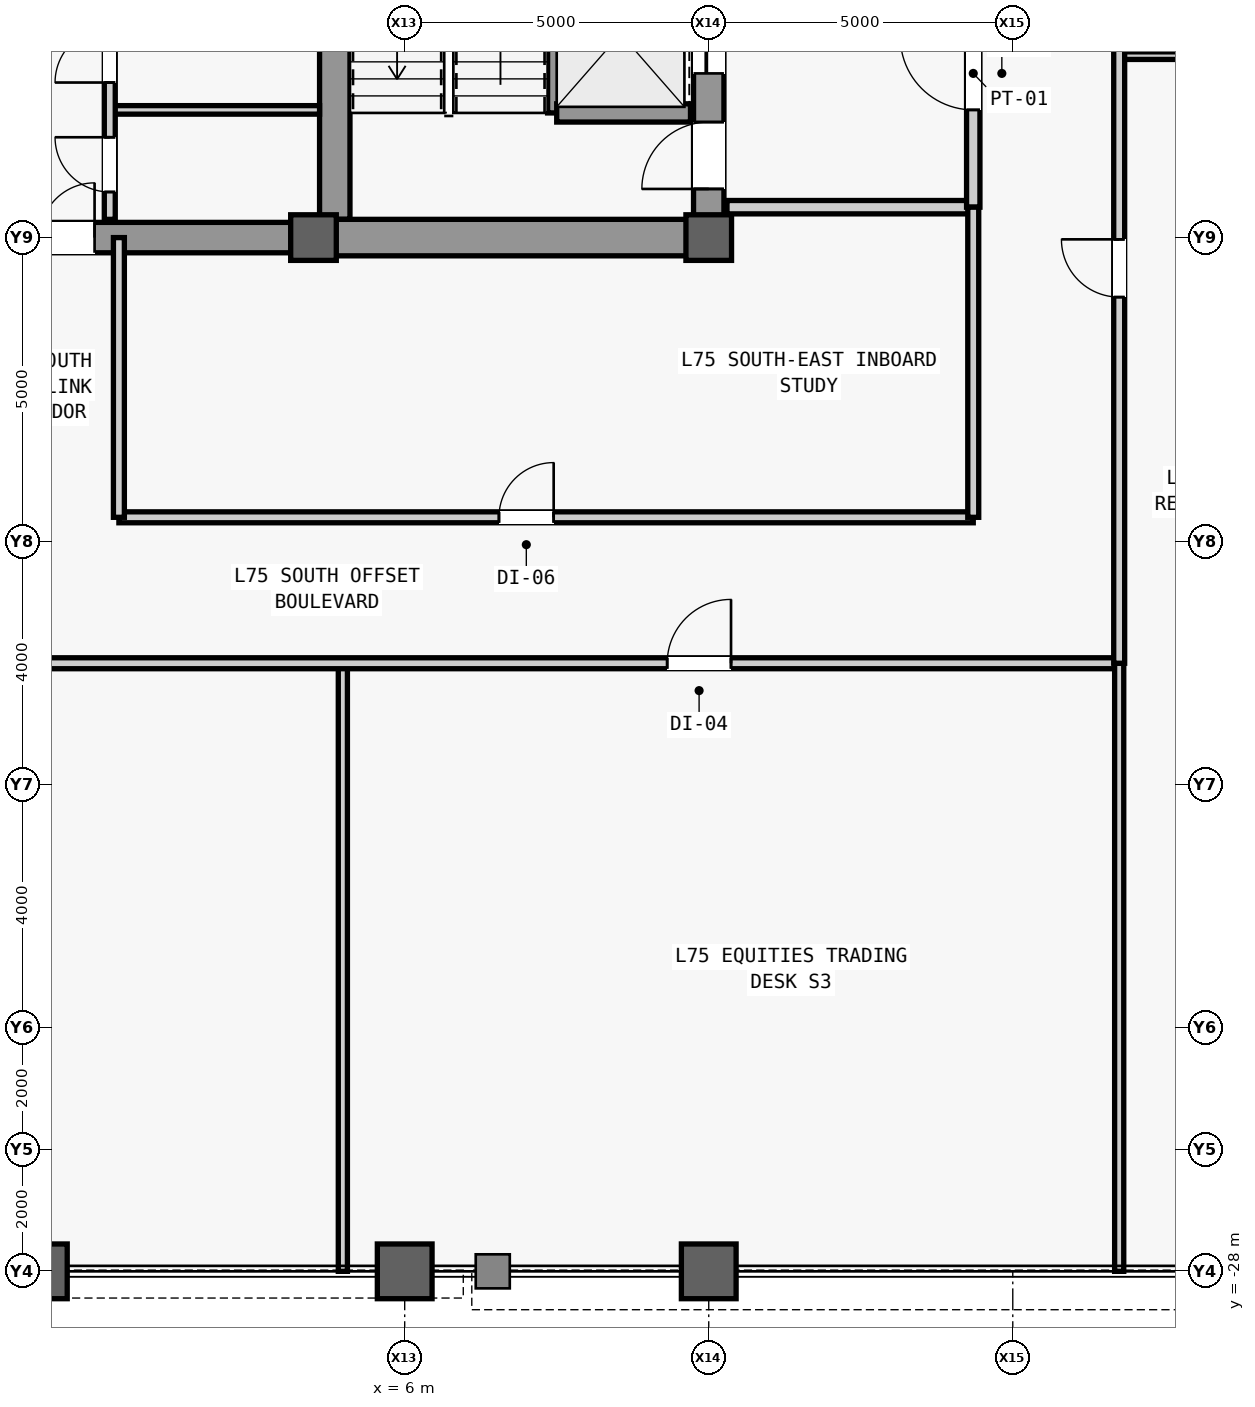
"""IFC4 building model, lengths in metres.
Left out: names, types, materials, properties, quantities, classifications, styles, units other than length and angle.
Written with IfcOpenShell. Run it as: python <this file> out.ifc"""

import sys

from ifc_helpers import new_model, si_unit, direction, frame, frame_2d, origin, origin_2d, place, context, subcontext, project, spatial, rectangle, hollow_rectangle, extrude, source, transform, mapped, element, fill, save


model = new_model("IFC4")
c1 = context("Model", 3, precision=1e-05, world=origin(), true_north=direction((0.0, 1.0)))
c2 = subcontext(c1, "Body", "Model", "MODEL_VIEW")
j1 = project(units=[si_unit("LENGTHUNIT", "METRE"), si_unit("PLANEANGLEUNIT", "RADIAN")], contexts=[c1])
p1 = place(None, origin())
s1 = spatial("IfcSite", under=j1, at=p1, CompositionType="ELEMENT")
p2 = place(p1, origin())
s2 = spatial("IfcBuilding", under=s1, at=p2, CompositionType="ELEMENT")
p3 = place(p2, frame((0.0, 0.0, 317.5)))
s3 = spatial("IfcBuildingStorey", under=s2, at=p3, CompositionType="ELEMENT", Elevation=317.5)
m1 = source(origin(), c2, "Body", "SweptSolid", [
    extrude(rectangle(XDim=22.0, YDim=0.5, at=frame_2d((11.0, 0.0))), origin(), (0.0, 0.0, 1.0), 3.78),
])
p4 = place(p3, frame((11.0, -11.0, 0.0), z_axis=(0.0, 0.0, 1.0), x_axis=(0.0, 1.0, 0.0)))
e1 = element("IfcWall", 1, at=p4, inside=s3, PredefinedType="SHEAR", context=c2, shape_type="MappedRepresentation", body=[
    mapped(m1, transform((0.0, 0.0, 0.0), scale=1.0)),
])
m2 = source(origin(), c2, "Body", "SweptSolid", [
    extrude(rectangle(XDim=1.1, YDim=2.2, at=frame_2d((0.55, 1.1))), frame((0.0, 0.26, 0.0), z_axis=(0.0, -1.0, 0.0), x_axis=(1.0, 0.0, 0.0)), (0.0, 0.0, 1.0), 0.52),
])
p5 = place(p4, frame((0.8, 0.0, 0.0)))
e2 = element("IfcOpeningElement", 2, at=p5, cuts=e1, PredefinedType="OPENING", context=c2, shape_type="MappedRepresentation", body=[
    mapped(m2, transform((0.0, 0.0, 0.0), scale=1.0)),
])
m3 = source(origin(), c2, "Body", "SweptSolid", [
    extrude(rectangle(XDim=0.9, YDim=2.15, at=frame_2d((0.45, 1.075))), frame((0.0, 0.26, 0.0), z_axis=(0.0, -1.0, 0.0), x_axis=(1.0, 0.0, 0.0)), (0.0, 0.0, 1.0), 0.52),
])
p6 = place(p4, frame((6.85, 0.0, 0.0)))
e3 = element("IfcOpeningElement", 3, at=p6, cuts=e1, PredefinedType="OPENING", context=c2, shape_type="MappedRepresentation", body=[
    mapped(m3, transform((0.0, 0.0, 0.0), scale=1.0)),
])
m4 = source(origin(), c2, "Body", "SweptSolid", [
    extrude(rectangle(XDim=1.2, YDim=2.3, at=frame_2d((0.6, 1.15))), frame((0.0, 0.26, 0.0), z_axis=(0.0, -1.0, 0.0), x_axis=(1.0, 0.0, 0.0)), (0.0, 0.0, 1.0), 0.52),
])
p7 = place(p4, frame((17.6, 0.0, 0.0)))
e4 = element("IfcOpeningElement", 4, at=p7, cuts=e1, PredefinedType="OPENING", context=c2, shape_type="MappedRepresentation", body=[
    mapped(m4, transform((0.0, 0.0, 0.0), scale=1.0)),
])
p8 = place(p4, frame((19.6, 0.0, 0.0)))
e5 = element("IfcOpeningElement", 5, at=p8, cuts=e1, PredefinedType="OPENING", context=c2, shape_type="MappedRepresentation", body=[
    mapped(m4, transform((0.0, 0.0, 0.0), scale=1.0)),
])
m5 = source(origin(), c2, "Body", "SweptSolid", [
    extrude(rectangle(XDim=1.3, YDim=2.3, at=frame_2d((0.65, 1.15))), frame((0.0, 0.26, 0.0), z_axis=(0.0, -1.0, 0.0), x_axis=(1.0, 0.0, 0.0)), (0.0, 0.0, 1.0), 0.52),
])
p9 = place(p4, frame((2.7, 0.0, 0.0)))
e6 = element("IfcOpeningElement", 6, at=p9, cuts=e1, PredefinedType="OPENING", context=c2, shape_type="MappedRepresentation", body=[
    mapped(m5, transform((0.0, 0.0, 0.0), scale=1.0)),
])
p10 = place(p4, frame((13.35, 0.0, 0.0)))
e7 = element("IfcOpeningElement", 7, at=p10, cuts=e1, PredefinedType="OPENING", context=c2, shape_type="MappedRepresentation", body=[
    mapped(m5, transform((0.0, 0.0, 0.0), scale=1.0)),
])
m6 = source(origin(), c2, "Body", "SweptSolid", [
    extrude(rectangle(XDim=21.4, YDim=0.5, at=frame_2d((10.7, 0.0))), origin(), (0.0, 0.0, 1.0), 3.78),
])
p11 = place(p3, frame((4.85, -10.7, 0.0), z_axis=(0.0, 0.0, 1.0), x_axis=(0.0, 1.0, 0.0)))
e8 = element("IfcWall", 8, at=p11, inside=s3, PredefinedType="SHEAR", context=c2, shape_type="MappedRepresentation", body=[
    mapped(m6, transform((0.0, 0.0, 0.0), scale=1.0)),
])
m7 = source(origin(), c2, "Body", "SweptSolid", [
    extrude(rectangle(XDim=5.9, YDim=0.6, at=frame_2d((2.95, 0.0))), origin(), (0.0, 0.0, 1.0), 3.78),
])
p12 = place(p3, frame((4.85, -11.0, 0.0), z_axis=(0.0, 0.0, 1.0), x_axis=(1.0, 0.0, 0.0)))
e9 = element("IfcWall", 9, at=p12, inside=s3, PredefinedType="SHEAR", context=c2, shape_type="MappedRepresentation", body=[
    mapped(m7, transform((0.0, 0.0, 0.0), scale=1.0)),
])
m8 = source(origin(), c2, "Body", "SweptSolid", [
    extrude(rectangle(XDim=9.2, YDim=0.5, at=frame_2d((4.6, 0.0))), origin(), (0.0, 0.0, 1.0), 3.78),
])
p13 = place(p3, frame((-4.6, -11.0, 0.0), z_axis=(0.0, 0.0, 1.0), x_axis=(1.0, 0.0, 0.0)))
e10 = element("IfcWall", 10, at=p13, inside=s3, PredefinedType="SHEAR", context=c2, shape_type="MappedRepresentation", body=[
    mapped(m8, transform((0.0, 0.0, 0.0), scale=1.0)),
])
m9 = source(origin(), c2, "Body", "SweptSolid", [
    extrude(rectangle(XDim=1.8, YDim=2.25, at=frame_2d((0.9, 1.125))), frame((0.0, 0.26, 0.0), z_axis=(0.0, -1.0, 0.0), x_axis=(1.0, 0.0, 0.0)), (0.0, 0.0, 1.0), 0.52),
])
p14 = place(p13, frame((3.7, 0.0, 0.0)))
e11 = element("IfcOpeningElement", 11, at=p14, cuts=e10, PredefinedType="OPENING", context=c2, shape_type="MappedRepresentation", body=[
    mapped(m9, transform((0.0, 0.0, 0.0), scale=1.0)),
])
m10 = source(origin(), c2, "Body", "SweptSolid", [
    extrude(hollow_rectangle(XDim=0.9, YDim=0.9, WallThickness=0.05, at=origin_2d()), origin(), (0.0, 0.0, 1.0), 4.0),
])
p15 = place(p3, frame((0.0, -28.0, 0.0), z_axis=(0.0, 0.0, 1.0), x_axis=(1.0, 0.0, 0.0)))
e12 = element("IfcColumn", 12, at=p15, inside=s3, PredefinedType="COLUMN", context=c2, shape_type="MappedRepresentation", body=[
    mapped(m10, transform((0.0, 0.0, 0.0), scale=1.0)),
])
m11 = source(origin(), c2, "Body", "SweptSolid", [
    extrude(rectangle(XDim=0.75, YDim=0.75, at=origin_2d()), origin(), (0.0, 0.0, 1.0), 4.0),
])
p16 = place(p3, frame((4.5, -11.0, 0.0), z_axis=(0.0, 0.0, 1.0), x_axis=(1.0, 0.0, 0.0)))
e13 = element("IfcColumn", 13, at=p16, inside=s3, PredefinedType="COLUMN", context=c2, shape_type="MappedRepresentation", body=[
    mapped(m11, transform((0.0, 0.0, 0.0), scale=1.0)),
])
for number, where, z_axis, x_axis in (
    (14, (6.0, -28.0, 0.0), (0.0, 0.0, 1.0), (1.0, 0.0, 0.0)),
    (15, (11.0, -28.0, 0.0), (0.0, 0.0, 1.0), (1.0, 0.0, 0.0)),
):
    element("IfcColumn", number, at=place(p3, frame(where, z_axis=z_axis, x_axis=x_axis)), inside=s3, PredefinedType="COLUMN", context=c2, shape_type="MappedRepresentation", body=[
        mapped(m10, transform((0.0, 0.0, 0.0), scale=1.0)),
    ])
p17 = place(p3, frame((11.0, -11.0, 0.0), z_axis=(0.0, 0.0, 1.0), x_axis=(1.0, 0.0, 0.0)))
e16 = element("IfcColumn", 16, at=p17, inside=s3, PredefinedType="COLUMN", context=c2, shape_type="MappedRepresentation", body=[
    mapped(m11, transform((0.0, 0.0, 0.0), scale=1.0)),
])
m12 = source(origin(), c2, "Body", "SweptSolid", [
    extrude(rectangle(XDim=7.8, YDim=0.3, at=frame_2d((3.9, 0.0))), origin(), (0.0, 0.0, 1.0), 3.78),
])
p18 = place(p3, frame((8.5, -8.95, 0.0), z_axis=(0.0, 0.0, 1.0), x_axis=(0.0, 1.0, 0.0)))
e17 = element("IfcWall", 17, at=p18, inside=s3, PredefinedType="SHEAR", context=c2, shape_type="MappedRepresentation", body=[
    mapped(m12, transform((0.0, 0.0, 0.0), scale=1.0)),
])
m13 = source(origin(), c2, "Body", "SweptSolid", [
    extrude(rectangle(XDim=2.2, YDim=0.3, at=frame_2d((1.1, 0.0))), origin(), (0.0, 0.0, 1.0), 3.78),
])
p19 = place(p3, frame((8.5, -8.95, 0.0), z_axis=(0.0, 0.0, 1.0), x_axis=(1.0, 0.0, 0.0)))
e18 = element("IfcWall", 18, at=p19, inside=s3, PredefinedType="SHEAR", context=c2, shape_type="MappedRepresentation", body=[
    mapped(m13, transform((0.0, 0.0, 0.0), scale=1.0)),
])
m14 = source(origin(), c2, "Body", "SweptSolid", [
    extrude(rectangle(XDim=4.05, YDim=0.22, at=frame_2d((2.025, 0.0))), origin(), (0.0, 0.0, 1.0), 3.78),
])
p20 = place(p3, frame((11.3, -10.5, 0.0), z_axis=(0.0, 0.0, 1.0), x_axis=(1.0, 0.0, 0.0)))
e19 = element("IfcWall", 19, at=p20, inside=s3, PredefinedType="PARTITIONING", context=c2, shape_type="MappedRepresentation", body=[
    mapped(m14, transform((0.0, 0.0, 0.0), scale=1.0)),
])
m15 = source(origin(), c2, "Body", "SweptSolid", [
    extrude(rectangle(XDim=4.4, YDim=0.22, at=frame_2d((2.2, 0.0))), origin(), (0.0, 0.0, 1.0), 3.78),
])
p21 = place(p3, frame((15.35, -10.5, 0.0), z_axis=(0.0, 0.0, 1.0), x_axis=(0.0, 1.0, 0.0)))
e20 = element("IfcWall", 20, at=p21, inside=s3, PredefinedType="PARTITIONING", context=c2, shape_type="MappedRepresentation", body=[
    mapped(m15, transform((0.0, 0.0, 0.0), scale=1.0)),
])
m16 = source(origin(), c2, "Body", "SweptSolid", [
    extrude(rectangle(XDim=1.2, YDim=2.2, at=frame_2d((0.6, 1.1))), frame((0.0, 0.12, 0.0), z_axis=(0.0, -1.0, 0.0), x_axis=(1.0, 0.0, 0.0)), (0.0, 0.0, 1.0), 0.24),
])
p22 = place(p21, frame((1.6, 0.0, 0.0)))
e21 = element("IfcOpeningElement", 21, at=p22, cuts=e20, PredefinedType="OPENING", context=c2, shape_type="MappedRepresentation", body=[
    mapped(m16, transform((0.0, 0.0, 0.0), scale=1.0)),
])
m17 = source(origin(), c2, "Body", "SweptSolid", [
    extrude(rectangle(XDim=3.45, YDim=0.14, at=frame_2d((1.725, 0.0))), origin(), (0.0, 0.0, 1.0), 3.78),
])
p23 = place(p3, frame((1.15, -8.9, 0.0), z_axis=(0.0, 0.0, 1.0), x_axis=(1.0, 0.0, 0.0)))
e22 = element("IfcWall", 22, at=p23, inside=s3, PredefinedType="PARTITIONING", context=c2, shape_type="MappedRepresentation", body=[
    mapped(m17, transform((0.0, 0.0, 0.0), scale=1.0)),
])
m18 = source(origin(), c2, "Body", "SweptSolid", [
    extrude(rectangle(XDim=5.4, YDim=0.18, at=frame_2d((2.7, 0.0))), origin(), (0.0, 0.0, 1.0), 3.78),
])
p24 = place(p3, frame((1.15, -10.7, 0.0), z_axis=(0.0, 0.0, 1.0), x_axis=(0.0, 1.0, 0.0)))
e23 = element("IfcWall", 23, at=p24, inside=s3, PredefinedType="PARTITIONING", context=c2, shape_type="MappedRepresentation", body=[
    mapped(m18, transform((0.0, 0.0, 0.0), scale=1.0)),
])
m19 = source(origin(), c2, "Body", "SweptSolid", [
    extrude(rectangle(XDim=0.9, YDim=2.15, at=frame_2d((0.45, 1.075))), frame((0.0, 0.1, 0.0), z_axis=(0.0, -1.0, 0.0), x_axis=(1.0, 0.0, 0.0)), (0.0, 0.0, 1.0), 0.2),
])
p25 = place(p24, frame((0.45, 0.0, 0.0)))
e24 = element("IfcOpeningElement", 24, at=p25, cuts=e23, PredefinedType="OPENING", context=c2, shape_type="MappedRepresentation", body=[
    mapped(m19, transform((0.0, 0.0, 0.0), scale=1.0)),
])
p26 = place(p24, frame((2.25, 0.0, 0.0)))
e25 = element("IfcOpeningElement", 25, at=p26, cuts=e23, PredefinedType="OPENING", context=c2, shape_type="MappedRepresentation", body=[
    mapped(m19, transform((0.0, 0.0, 0.0), scale=1.0)),
])
p27 = place(p24, frame((4.05, 0.0, 0.0)))
e26 = element("IfcOpeningElement", 26, at=p27, cuts=e23, PredefinedType="OPENING", context=c2, shape_type="MappedRepresentation", body=[
    mapped(m19, transform((0.0, 0.0, 0.0), scale=1.0)),
])
m20 = source(origin(), c2, "Body", "SweptSolid", [
    extrude(rectangle(XDim=14.05, YDim=0.18, at=frame_2d((7.025, 0.0))), origin(), (0.0, 0.0, 1.0), 3.78),
])
p28 = place(p3, frame((1.3, -15.6, 0.0), z_axis=(0.0, 0.0, 1.0), x_axis=(1.0, 0.0, 0.0)))
e27 = element("IfcWall", 27, at=p28, inside=s3, PredefinedType="PARTITIONING", context=c2, shape_type="MappedRepresentation", body=[
    mapped(m20, transform((0.0, 0.0, 0.0), scale=1.0)),
])
p29 = place(p28, frame((6.25, 0.0, 0.0)))
e28 = element("IfcOpeningElement", 28, at=p29, cuts=e27, PredefinedType="OPENING", context=c2, shape_type="MappedRepresentation", body=[
    mapped(m19, transform((0.0, 0.0, 0.0), scale=1.0)),
])
m21 = source(origin(), c2, "Body", "SweptSolid", [
    extrude(rectangle(XDim=4.6, YDim=0.18, at=frame_2d((2.3, 0.0))), origin(), (0.0, 0.0, 1.0), 3.78),
])
p30 = place(p3, frame((1.3, -15.6, 0.0), z_axis=(0.0, 0.0, 1.0), x_axis=(0.0, 1.0, 0.0)))
e29 = element("IfcWall", 29, at=p30, inside=s3, PredefinedType="PARTITIONING", context=c2, shape_type="MappedRepresentation", body=[
    mapped(m21, transform((0.0, 0.0, 0.0), scale=1.0)),
])
m22 = source(origin(), c2, "Body", "SweptSolid", [
    extrude(rectangle(XDim=5.1, YDim=0.18, at=frame_2d((2.55, 0.0))), origin(), (0.0, 0.0, 1.0), 3.78),
])
p31 = place(p3, frame((15.35, -15.6, 0.0), z_axis=(0.0, 0.0, 1.0), x_axis=(0.0, 1.0, 0.0)))
e30 = element("IfcWall", 30, at=p31, inside=s3, PredefinedType="PARTITIONING", context=c2, shape_type="MappedRepresentation", body=[
    mapped(m22, transform((0.0, 0.0, 0.0), scale=1.0)),
])
m23 = source(origin(), c2, "Body", "SweptSolid", [
    extrude(rectangle(XDim=10.0, YDim=0.15, at=frame_2d((5.0, 0.0))), origin(), (0.0, 0.0, 1.0), 3.78),
])
p32 = place(p3, frame((4.983, -28.0, 0.0), z_axis=(0.0, 0.0, 1.0), x_axis=(0.0, 1.0, 0.0)))
e31 = element("IfcWall", 31, at=p32, inside=s3, PredefinedType="PARTITIONING", context=c2, shape_type="MappedRepresentation", body=[
    mapped(m23, transform((0.0, 0.0, 0.0), scale=1.0)),
])
m24 = source(origin(), c2, "Body", "SweptSolid", [
    extrude(rectangle(XDim=37.55, YDim=0.18, at=frame_2d((18.775, 0.0))), origin(), (0.0, 0.0, 1.0), 3.78),
])
p33 = place(p3, frame((-19.8, -18.0, 0.0), z_axis=(0.0, 0.0, 1.0), x_axis=(1.0, 0.0, 0.0)))
e32 = element("IfcWall", 32, at=p33, inside=s3, PredefinedType="PARTITIONING", context=c2, shape_type="MappedRepresentation", body=[
    mapped(m24, transform((0.0, 0.0, 0.0), scale=1.0)),
])
m25 = source(origin(), c2, "Body", "SweptSolid", [
    extrude(rectangle(XDim=1.05, YDim=2.2, at=frame_2d((0.525, 1.1))), frame((0.0, 0.1, 0.0), z_axis=(0.0, -1.0, 0.0), x_axis=(1.0, 0.0, 0.0)), (0.0, 0.0, 1.0), 0.2),
])
p34 = place(p33, frame((5.983, 0.0, 0.0)))
e33 = element("IfcOpeningElement", 33, at=p34, cuts=e32, PredefinedType="OPENING", context=c2, shape_type="MappedRepresentation", body=[
    mapped(m25, transform((0.0, 0.0, 0.0), scale=1.0)),
])
p35 = place(p33, frame((17.875, 0.0, 0.0)))
e34 = element("IfcOpeningElement", 34, at=p35, cuts=e32, PredefinedType="OPENING", context=c2, shape_type="MappedRepresentation", body=[
    mapped(m25, transform((0.0, 0.0, 0.0), scale=1.0)),
])
p36 = place(p33, frame((30.116, 0.0, 0.0)))
e35 = element("IfcOpeningElement", 35, at=p36, cuts=e32, PredefinedType="OPENING", context=c2, shape_type="MappedRepresentation", body=[
    mapped(m25, transform((0.0, 0.0, 0.0), scale=1.0)),
])
p37 = place(p3, frame((17.75, -28.0, 0.0), z_axis=(0.0, 0.0, 1.0), x_axis=(0.0, 1.0, 0.0)))
e36 = element("IfcWall", 36, at=p37, inside=s3, PredefinedType="PARTITIONING", context=c2, shape_type="MappedRepresentation", body=[
    mapped(m23, transform((0.0, 0.0, 0.0), scale=1.0)),
])
m26 = source(origin(), c2, "Body", "SweptSolid", [
    extrude(rectangle(XDim=10.25, YDim=0.125, at=frame_2d((5.125, 0.0))), origin(), (0.0, 0.0, 1.0), 3.78),
])
p38 = place(p3, frame((17.75, -8.008, 0.0), z_axis=(0.0, 0.0, 1.0), x_axis=(1.0, 0.0, 0.0)))
e37 = element("IfcWall", 37, at=p38, inside=s3, PredefinedType="PARTITIONING", context=c2, shape_type="MappedRepresentation", body=[
    mapped(m26, transform((0.0, 0.0, 0.0), scale=1.0)),
])
m27 = source(origin(), c2, "Body", "SweptSolid", [
    extrude(rectangle(XDim=40.5, YDim=0.18, at=frame_2d((20.25, 0.0))), origin(), (0.0, 0.0, 1.0), 3.78),
])
p39 = place(p3, frame((17.75, -18.0, 0.0), z_axis=(0.0, 0.0, 1.0), x_axis=(0.0, 1.0, 0.0)))
e38 = element("IfcWall", 38, at=p39, inside=s3, PredefinedType="PARTITIONING", context=c2, shape_type="MappedRepresentation", body=[
    mapped(m27, transform((0.0, 0.0, 0.0), scale=1.0)),
])
m28 = source(origin(), c2, "Body", "SweptSolid", [
    extrude(rectangle(XDim=0.95, YDim=2.15, at=frame_2d((0.475, 1.075))), frame((0.0, 0.1, 0.0), z_axis=(0.0, -1.0, 0.0), x_axis=(1.0, 0.0, 0.0)), (0.0, 0.0, 1.0), 0.2),
])
p40 = place(p39, frame((6.021, 0.0, 0.0)))
e39 = element("IfcOpeningElement", 39, at=p40, cuts=e38, PredefinedType="OPENING", context=c2, shape_type="MappedRepresentation", body=[
    mapped(m28, transform((0.0, 0.0, 0.0), scale=1.0)),
])
p41 = place(p39, frame((14.481, 0.0, 0.0)))
e40 = element("IfcOpeningElement", 40, at=p41, cuts=e38, PredefinedType="OPENING", context=c2, shape_type="MappedRepresentation", body=[
    mapped(m28, transform((0.0, 0.0, 0.0), scale=1.0)),
])
p42 = place(p39, frame((24.985, 0.0, 0.0)))
e41 = element("IfcOpeningElement", 41, at=p42, cuts=e38, PredefinedType="OPENING", context=c2, shape_type="MappedRepresentation", body=[
    mapped(m28, transform((0.0, 0.0, 0.0), scale=1.0)),
])
m29 = source(origin(), c2, "Body", "SweptSolid", [
    extrude(rectangle(XDim=1.1, YDim=2.2, at=frame_2d((0.55, 1.1))), frame((0.0, 0.025, 0.0), z_axis=(0.0, -1.0, 0.0), x_axis=(1.0, 0.0, 0.0)), (0.0, 0.0, 1.0), 0.05),
])
p43 = place(p5, origin())
e42 = element("IfcDoor", 42, at=p43, inside=s3, OperationType="SINGLE_SWING_LEFT", PredefinedType="DOOR", context=c2, shape_type="MappedRepresentation", body=[
    mapped(m29, transform((0.0, 0.0, 0.0), scale=1.0)),
])
fill(e2, e42)
m30 = source(origin(), c2, "Body", "SweptSolid", [
    extrude(rectangle(XDim=1.2, YDim=2.2, at=frame_2d((0.6, 1.1))), frame((0.0, 0.025, 0.0), z_axis=(0.0, -1.0, 0.0), x_axis=(1.0, 0.0, 0.0)), (0.0, 0.0, 1.0), 0.05),
])
p44 = place(p22, origin())
e43 = element("IfcDoor", 43, at=p44, inside=s3, OperationType="SINGLE_SWING_RIGHT", PredefinedType="DOOR", context=c2, shape_type="MappedRepresentation", body=[
    mapped(m30, transform((0.0, 0.0, 0.0), scale=1.0)),
])
fill(e21, e43)
m31 = source(origin(), c2, "Body", "SweptSolid", [
    extrude(rectangle(XDim=0.9, YDim=2.15, at=frame_2d((0.45, 1.075))), frame((0.0, 0.025, 0.0), z_axis=(0.0, -1.0, 0.0), x_axis=(1.0, 0.0, 0.0)), (0.0, 0.0, 1.0), 0.05),
])
p45 = place(p25, origin())
e44 = element("IfcDoor", 44, at=p45, inside=s3, OperationType="SINGLE_SWING_RIGHT", PredefinedType="DOOR", context=c2, shape_type="MappedRepresentation", body=[
    mapped(m31, transform((0.0, 0.0, 0.0), scale=1.0)),
])
fill(e24, e44)
p46 = place(p26, origin())
e45 = element("IfcDoor", 45, at=p46, inside=s3, OperationType="SINGLE_SWING_LEFT", PredefinedType="DOOR", context=c2, shape_type="MappedRepresentation", body=[
    mapped(m31, transform((0.0, 0.0, 0.0), scale=1.0)),
])
fill(e25, e45)
m32 = source(origin(), c2, "Body", "SweptSolid", [
    extrude(rectangle(XDim=1.8, YDim=2.25, at=frame_2d((0.9, 1.125))), frame((0.0, 0.025, 0.0), z_axis=(0.0, -1.0, 0.0), x_axis=(1.0, 0.0, 0.0)), (0.0, 0.0, 1.0), 0.05),
])
p47 = place(p14, origin())
e46 = element("IfcDoor", 46, at=p47, inside=s3, OperationType="SINGLE_SWING_LEFT", PredefinedType="DOOR", context=c2, shape_type="MappedRepresentation", body=[
    mapped(m32, transform((0.0, 0.0, 0.0), scale=1.0)),
])
fill(e11, e46)
p48 = place(p29, origin())
e47 = element("IfcDoor", 47, at=p48, inside=s3, OperationType="SINGLE_SWING_RIGHT", PredefinedType="DOOR", context=c2, shape_type="MappedRepresentation", body=[
    mapped(m31, transform((0.0, 0.0, 0.0), scale=1.0)),
])
fill(e28, e47)
m33 = source(origin(), c2, "Body", "SweptSolid", [
    extrude(rectangle(XDim=1.05, YDim=2.2, at=frame_2d((0.525, 1.1))), frame((0.0, 0.025, 0.0), z_axis=(0.0, -1.0, 0.0), x_axis=(1.0, 0.0, 0.0)), (0.0, 0.0, 1.0), 0.05),
])
p49 = place(p36, origin())
e48 = element("IfcDoor", 48, at=p49, inside=s3, OperationType="SINGLE_SWING_RIGHT", PredefinedType="DOOR", context=c2, shape_type="MappedRepresentation", body=[
    mapped(m33, transform((0.0, 0.0, 0.0), scale=1.0)),
])
fill(e35, e48)
m34 = source(origin(), c2, "Body", "SweptSolid", [
    extrude(rectangle(XDim=0.95, YDim=2.15, at=frame_2d((0.475, 1.075))), frame((0.0, 0.025, 0.0), z_axis=(0.0, -1.0, 0.0), x_axis=(1.0, 0.0, 0.0)), (0.0, 0.0, 1.0), 0.05),
])
p50 = place(p40, origin())
e49 = element("IfcDoor", 49, at=p50, inside=s3, OperationType="SINGLE_SWING_RIGHT", PredefinedType="DOOR", context=c2, shape_type="MappedRepresentation", body=[
    mapped(m34, transform((0.0, 0.0, 0.0), scale=1.0)),
])
fill(e39, e49)
m35 = source(origin(), c2, "Body", "SweptSolid", [
    extrude(rectangle(XDim=1.3, YDim=2.3, at=frame_2d((0.65, 1.15))), frame((0.0, 0.025, 0.0), z_axis=(0.0, -1.0, 0.0), x_axis=(1.0, 0.0, 0.0)), (0.0, 0.0, 1.0), 0.05),
])
p51 = place(p9, origin())
e50 = element("IfcDoor", 50, at=p51, inside=s3, OperationType="SLIDING_TO_LEFT", PredefinedType="DOOR", context=c2, shape_type="MappedRepresentation", body=[
    mapped(m35, transform((0.0, 0.0, 0.0), scale=1.0)),
])
fill(e6, e50)
save(model, sys.argv[1])
